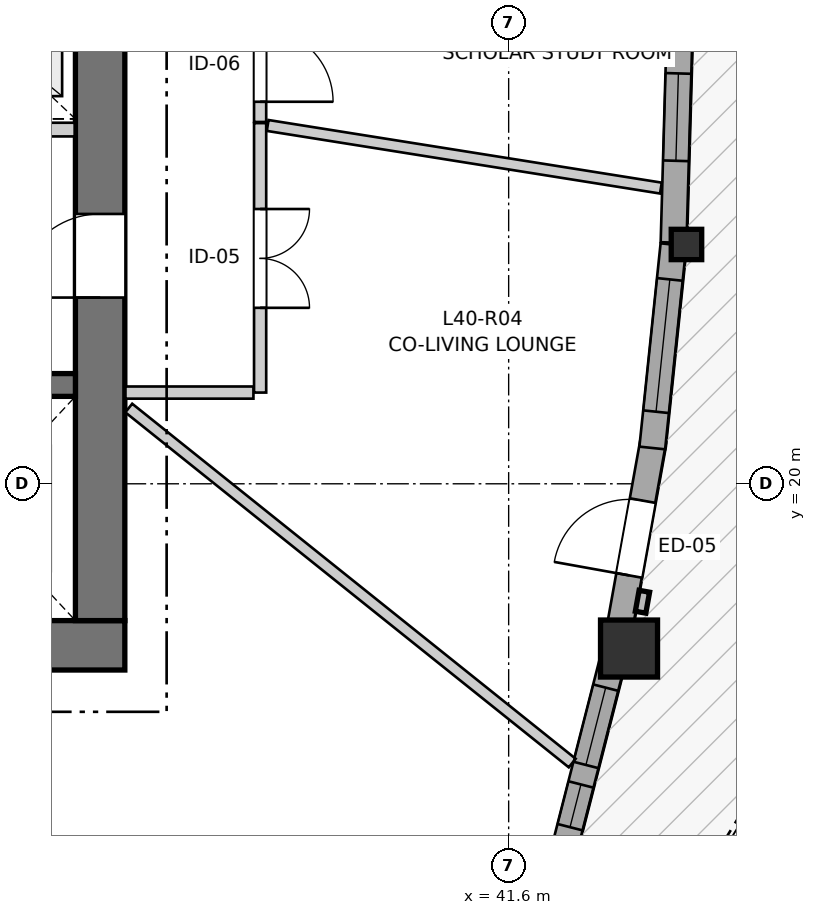
"""IFC4 building model, lengths in metres.
Left out: names, types, materials, properties, quantities, classifications, styles, units other than length and angle.
Written with IfcOpenShell. Run it as: python <this file> out.ifc"""

import sys

from ifc_helpers import new_model, si_unit, direction, frame, frame_2d, origin, origin_2d, place, context, subcontext, project, spatial, rectangle, i_section, extrude, source, transform, mapped, element, fill, save


model = new_model("IFC4")
c1 = context("Model", 3, precision=1e-05, world=origin(), true_north=direction((0.0, 1.0)))
c2 = subcontext(c1, "Body", "Model", "MODEL_VIEW")
j1 = project(units=[si_unit("LENGTHUNIT", "METRE"), si_unit("PLANEANGLEUNIT", "RADIAN")], contexts=[c1])
p1 = place(None, origin())
s1 = spatial("IfcSite", under=j1, at=p1, CompositionType="ELEMENT")
p2 = place(p1, origin())
s2 = spatial("IfcBuilding", under=s1, at=p2, CompositionType="ELEMENT")
p3 = place(p2, frame((0.0, 0.0, 136.2)))
s3 = spatial("IfcBuildingStorey", under=s2, at=p3, CompositionType="ELEMENT", Elevation=136.2)
p4 = place(p3, frame((24.15, 17.875, 0.0), z_axis=(0.0, 0.0, 1.0), x_axis=(1.0, 0.0, 0.0)))
e1 = element("IfcWall", 1, at=p4, inside=s3, PredefinedType="SHEAR", context=c2, shape_type="SweptSolid", body=[
    extrude(rectangle(XDim=12.4, YDim=0.65, at=frame_2d((6.2, 0.0))), origin(), (0.0, 0.0, 1.0), 2.95),
])
p5 = place(p3, frame((36.225, 18.2, 0.0), z_axis=(0.0, 0.0, 1.0), x_axis=(0.0, 1.0, 0.0)))
e2 = element("IfcWall", 2, at=p5, inside=s3, PredefinedType="SHEAR", context=c2, shape_type="SweptSolid", body=[
    extrude(rectangle(XDim=15.6, YDim=0.65, at=frame_2d((7.8, 0.0))), origin(), (0.0, 0.0, 1.0), 2.95),
])
p6 = place(p5, frame((4.25, 0.0, 0.0)))
e3 = element("IfcOpeningElement", 3, at=p6, cuts=e2, PredefinedType="OPENING", context=c2, shape_type="SweptSolid", body=[
    extrude(rectangle(XDim=1.1, YDim=2.15, at=frame_2d((0.55, 1.075))), frame((0.0, 0.335, 0.0), z_axis=(0.0, -1.0, 0.0), x_axis=(1.0, 0.0, 0.0)), (0.0, 0.0, 1.0), 0.67),
])
p7 = place(p5, frame((10.25, 0.0, 0.0)))
e4 = element("IfcOpeningElement", 4, at=p7, cuts=e2, PredefinedType="OPENING", context=c2, shape_type="SweptSolid", body=[
    extrude(rectangle(XDim=1.1, YDim=2.15, at=frame_2d((0.55, 1.075))), frame((0.0, 0.335, 0.0), z_axis=(0.0, -1.0, 0.0), x_axis=(1.0, 0.0, 0.0)), (0.0, 0.0, 1.0), 0.67),
])
p8 = place(p3, frame((24.8, 21.3, 0.0), z_axis=(0.0, 0.0, 1.0), x_axis=(1.0, 0.0, 0.0)))
e5 = element("IfcWall", 5, at=p8, inside=s3, PredefinedType="SHEAR", context=c2, shape_type="SweptSolid", body=[
    extrude(rectangle(XDim=11.1, YDim=0.3, at=frame_2d((5.55, 0.0))), origin(), (0.0, 0.0, 1.0), 2.95),
])
p9 = place(p8, frame((6.22, 0.0, 0.0)))
e6 = element("IfcOpeningElement", 6, at=p9, cuts=e5, PredefinedType="OPENING", context=c2, shape_type="SweptSolid", body=[
    extrude(rectangle(XDim=0.98, YDim=2.15, at=frame_2d((0.49, 1.075))), frame((0.0, 0.16, 0.0), z_axis=(0.0, -1.0, 0.0), x_axis=(1.0, 0.0, 0.0)), (0.0, 0.0, 1.0), 0.32),
])
p10 = place(p8, frame((9.15, 0.0, 0.0)))
e7 = element("IfcOpeningElement", 7, at=p10, cuts=e5, PredefinedType="OPENING", context=c2, shape_type="SweptSolid", body=[
    extrude(rectangle(XDim=1.15, YDim=2.15, at=frame_2d((0.575, 1.075))), frame((0.0, 0.16, 0.0), z_axis=(0.0, -1.0, 0.0), x_axis=(1.0, 0.0, 0.0)), (0.0, 0.0, 1.0), 0.32),
])
m1 = source(origin(), c2, "Body", "SweptSolid", [
    extrude(rectangle(XDim=0.75, YDim=0.75, at=origin_2d()), origin(), (0.0, 0.0, 1.0), 2.95),
])
p11 = place(p3, frame((43.184, 17.833, 0.0), z_axis=(0.0, 0.0, 1.0), x_axis=(1.0, 0.0, 0.0)))
e8 = element("IfcColumn", 8, at=p11, inside=s3, PredefinedType="COLUMN", context=c2, shape_type="MappedRepresentation", body=[
    mapped(m1, transform((0.0, 0.0, 0.0), x_axis=(1.0, 0.0, 0.0), y_axis=(0.0, 1.0, 0.0), z_axis=(0.0, 0.0, 1.0), scale=1.0)),
])
m2 = source(origin(), c2, "Body", "SweptSolid", [
    extrude(i_section(OverallWidth=0.401, OverallDepth=0.399, WebThickness=0.023, FlangeThickness=0.036, FilletRadius=0.015, at=origin_2d()), origin(), (0.0, 0.0, 1.0), 2.95),
])
p12 = place(p3, frame((43.939, 23.148, 0.0), z_axis=(0.0, 0.0, 1.0), x_axis=(1.0, 0.0, 0.0)))
e9 = element("IfcColumn", 9, at=p12, inside=s3, PredefinedType="PILASTER", context=c2, shape_type="MappedRepresentation", body=[
    mapped(m2, transform((0.0, 0.0, 0.0), x_axis=(1.0, 0.0, 0.0), y_axis=(0.0, 1.0, 0.0), z_axis=(0.0, 0.0, 1.0), scale=1.0)),
])
p13 = place(p3, frame((42.329, 15.177, 0.0), z_axis=(0.0, 0.0, 1.0), x_axis=(0.247819063092, 0.968806333571, 0.0)))
e10 = element("IfcWall", 10, at=p13, inside=s3, PredefinedType="SOLIDWALL", context=c2, shape_type="SweptSolid", body=[
    extrude(rectangle(XDim=2.629, YDim=0.34, at=frame_2d((1.315, 0.0))), origin(), (0.0, 0.0, 1.0), 2.53),
])
p14 = place(p13, frame((0.315, 0.0, 0.82)))
e11 = element("IfcOpeningElement", 11, at=p14, cuts=e10, PredefinedType="OPENING", context=c2, shape_type="SweptSolid", body=[
    extrude(rectangle(XDim=0.58, YDim=1.35, at=frame_2d((0.29, 0.675))), frame((0.0, 0.18, 0.0), z_axis=(0.0, -1.0, 0.0), x_axis=(1.0, 0.0, 0.0)), (0.0, 0.0, 1.0), 0.36),
])
p15 = place(p13, frame((1.16, 0.0, 0.82)))
e12 = element("IfcOpeningElement", 12, at=p15, cuts=e10, PredefinedType="OPENING", context=c2, shape_type="SweptSolid", body=[
    extrude(rectangle(XDim=1.05, YDim=1.45, at=frame_2d((0.525, 0.725))), frame((0.0, 0.18, 0.0), z_axis=(0.0, -1.0, 0.0), x_axis=(1.0, 0.0, 0.0)), (0.0, 0.0, 1.0), 0.36),
])
p16 = place(p3, frame((43.044, 18.015, 0.0), z_axis=(0.0, 0.0, 1.0), x_axis=(0.177114569603, 0.984190240367, 0.0)))
e13 = element("IfcWall", 13, at=p16, inside=s3, PredefinedType="SOLIDWALL", context=c2, shape_type="SweptSolid", body=[
    extrude(rectangle(XDim=2.584, YDim=0.34, at=frame_2d((1.292, 0.0))), origin(), (0.0, 0.0, 1.0), 2.53),
])
p17 = place(p16, frame((0.792, 0.0, 0.0)))
e14 = element("IfcOpeningElement", 14, at=p17, cuts=e13, PredefinedType="OPENING", context=c2, shape_type="SweptSolid", body=[
    extrude(rectangle(XDim=1.0, YDim=2.1, at=frame_2d((0.5, 1.05))), frame((0.0, 0.18, 0.0), z_axis=(0.0, -1.0, 0.0), x_axis=(1.0, 0.0, 0.0)), (0.0, 0.0, 1.0), 0.36),
])
p18 = place(p3, frame((43.49, 20.471, 0.0), z_axis=(0.0, 0.0, 1.0), x_axis=(0.103673439924, 0.99461139037, 0.0)))
e15 = element("IfcWall", 15, at=p18, inside=s3, PredefinedType="SOLIDWALL", context=c2, shape_type="SweptSolid", body=[
    extrude(rectangle(XDim=2.689, YDim=0.34, at=frame_2d((1.345, 0.0))), origin(), (0.0, 0.0, 1.0), 2.53),
])
p19 = place(p18, frame((0.48, 0.0, 0.82)))
e16 = element("IfcOpeningElement", 16, at=p19, cuts=e15, PredefinedType="OPENING", context=c2, shape_type="SweptSolid", body=[
    extrude(rectangle(XDim=1.75, YDim=1.3, at=frame_2d((0.875, 0.65))), frame((0.0, 0.18, 0.0), z_axis=(0.0, -1.0, 0.0), x_axis=(1.0, 0.0, 0.0)), (0.0, 0.0, 1.0), 0.36),
])
p20 = place(p3, frame((43.77, 23.173, 0.0), z_axis=(0.0, 0.0, 1.0), x_axis=(0.028392968923, 0.999596838388, 0.0)))
e17 = element("IfcWall", 17, at=p20, inside=s3, PredefinedType="SOLIDWALL", context=c2, shape_type="SweptSolid", body=[
    extrude(rectangle(XDim=2.674, YDim=0.34, at=frame_2d((1.337, 0.0))), origin(), (0.0, 0.0, 1.0), 2.53),
])
p21 = place(p20, frame((1.076, 0.0, 0.82)))
e18 = element("IfcOpeningElement", 18, at=p21, cuts=e17, PredefinedType="OPENING", context=c2, shape_type="SweptSolid", body=[
    extrude(rectangle(XDim=1.15, YDim=1.2, at=frame_2d((0.575, 0.6))), frame((0.0, 0.18, 0.0), z_axis=(0.0, -1.0, 0.0), x_axis=(1.0, 0.0, 0.0)), (0.0, 0.0, 1.0), 0.36),
])
p22 = place(p3, frame((30.67, 24.66, 0.0), z_axis=(0.0, 0.0, 1.0), x_axis=(1.0, 0.0, 0.0)))
e19 = element("IfcWall", 19, at=p22, inside=s3, PredefinedType="PARTITIONING", context=c2, shape_type="SweptSolid", body=[
    extrude(rectangle(XDim=5.22, YDim=0.18, at=frame_2d((2.61, 0.0))), origin(), (0.0, 0.0, 1.0), 2.95),
])
p23 = place(p22, frame((0.68, 0.0, 0.0)))
e20 = element("IfcOpeningElement", 20, at=p23, cuts=e19, PredefinedType="OPENING", context=c2, shape_type="SweptSolid", body=[
    extrude(rectangle(XDim=0.98, YDim=2.15, at=frame_2d((0.49, 1.075))), frame((0.0, 0.1, 0.0), z_axis=(0.0, -1.0, 0.0), x_axis=(1.0, 0.0, 0.0)), (0.0, 0.0, 1.0), 0.2),
])
p24 = place(p3, frame((38.33, 24.745, 0.0), z_axis=(0.0, 0.0, 1.0), x_axis=(0.0, -1.0, 0.0)))
e21 = element("IfcWall", 21, at=p24, inside=s3, PredefinedType="PARTITIONING", context=c2, shape_type="SweptSolid", body=[
    extrude(rectangle(XDim=3.545, YDim=0.16, at=frame_2d((1.772, 0.0))), origin(), (0.0, 0.0, 1.0), 2.95),
])
p25 = place(p24, frame((1.13, 0.0, 0.0)))
e22 = element("IfcOpeningElement", 22, at=p25, cuts=e21, PredefinedType="OPENING", context=c2, shape_type="SweptSolid", body=[
    extrude(rectangle(XDim=1.3, YDim=2.1, at=frame_2d((0.65, 1.05))), frame((0.0, 0.09, 0.0), z_axis=(0.0, -1.0, 0.0), x_axis=(1.0, 0.0, 0.0)), (0.0, 0.0, 1.0), 0.18),
])
p26 = place(p3, frame((38.33, 26.252, 0.0), z_axis=(0.0, 0.0, 1.0), x_axis=(0.0, -1.0, 0.0)))
e23 = element("IfcWall", 23, at=p26, inside=s3, PredefinedType="PARTITIONING", context=c2, shape_type="SweptSolid", body=[
    extrude(rectangle(XDim=1.492, YDim=0.16, at=frame_2d((0.746, 0.0))), origin(), (0.0, 0.0, 1.0), 2.95),
])
p27 = place(p26, frame((0.266, 0.0, 0.0)))
e24 = element("IfcOpeningElement", 24, at=p27, cuts=e23, PredefinedType="OPENING", context=c2, shape_type="SweptSolid", body=[
    extrude(rectangle(XDim=0.96, YDim=2.1, at=frame_2d((0.48, 1.05))), frame((0.0, 0.09, 0.0), z_axis=(0.0, -1.0, 0.0), x_axis=(1.0, 0.0, 0.0)), (0.0, 0.0, 1.0), 0.18),
])
p28 = place(p3, frame((36.602, 20.997, 0.0), z_axis=(0.0, 0.0, 1.0), x_axis=(0.780696683128, -0.624910144703, 0.0)))
e25 = element("IfcWall", 25, at=p28, inside=s3, PredefinedType="PARTITIONING", context=c2, shape_type="SweptSolid", body=[
    extrude(rectangle(XDim=7.474, YDim=0.145, at=frame_2d((3.737, 0.0))), origin(), (0.0, 0.0, 1.0), 2.95),
])
p29 = place(p3, frame((38.429, 24.714, 0.0), z_axis=(0.0, 0.0, 1.0), x_axis=(0.987561894046, -0.157230739454, 0.0)))
e26 = element("IfcWall", 26, at=p29, inside=s3, PredefinedType="PARTITIONING", context=c2, shape_type="SweptSolid", body=[
    extrude(rectangle(XDim=5.239, YDim=0.145, at=frame_2d((2.62, 0.0))), origin(), (0.0, 0.0, 1.0), 2.95),
])
p30 = place(p3, frame((36.558, 21.2, 0.0), z_axis=(0.0, 0.0, 1.0), x_axis=(1.0, 0.0, 0.0)))
e27 = element("IfcWall", 27, at=p30, inside=s3, PredefinedType="PARTITIONING", context=c2, shape_type="SweptSolid", body=[
    extrude(rectangle(XDim=1.684, YDim=0.16, at=frame_2d((0.842, 0.0))), origin(), (0.0, 0.0, 1.0), 2.95),
])
m3 = source(origin(), c2, "Body", "SweptSolid", [
    extrude(rectangle(XDim=0.58, YDim=1.35, at=frame_2d((0.29, 0.675))), frame((0.0, 0.03, 0.0), z_axis=(0.0, -1.0, 0.0), x_axis=(1.0, 0.0, 0.0)), (0.0, 0.0, 1.0), 0.06),
])
p31 = place(p14, origin())
e28 = element("IfcWindow", 28, at=p31, inside=s3, PartitioningType="SINGLE_PANEL", PredefinedType="WINDOW", context=c2, shape_type="MappedRepresentation", body=[
    mapped(m3, transform((0.0, 0.0, 0.0), x_axis=(1.0, 0.0, 0.0), y_axis=(0.0, 1.0, 0.0), z_axis=(0.0, 0.0, 1.0), scale=1.0)),
])
fill(e11, e28)
m4 = source(origin(), c2, "Body", "SweptSolid", [
    extrude(rectangle(XDim=1.05, YDim=1.45, at=frame_2d((0.525, 0.725))), frame((0.0, 0.03, 0.0), z_axis=(0.0, -1.0, 0.0), x_axis=(1.0, 0.0, 0.0)), (0.0, 0.0, 1.0), 0.06),
])
p32 = place(p15, origin())
e29 = element("IfcWindow", 29, at=p32, inside=s3, PartitioningType="SINGLE_PANEL", PredefinedType="WINDOW", context=c2, shape_type="MappedRepresentation", body=[
    mapped(m4, transform((0.0, 0.0, 0.0), x_axis=(1.0, 0.0, 0.0), y_axis=(0.0, 1.0, 0.0), z_axis=(0.0, 0.0, 1.0), scale=1.0)),
])
fill(e12, e29)
m5 = source(origin(), c2, "Body", "SweptSolid", [
    extrude(rectangle(XDim=1.75, YDim=1.3, at=frame_2d((0.875, 0.65))), frame((0.0, 0.03, 0.0), z_axis=(0.0, -1.0, 0.0), x_axis=(1.0, 0.0, 0.0)), (0.0, 0.0, 1.0), 0.06),
])
p33 = place(p19, origin())
e30 = element("IfcWindow", 30, at=p33, inside=s3, PartitioningType="SINGLE_PANEL", PredefinedType="WINDOW", context=c2, shape_type="MappedRepresentation", body=[
    mapped(m5, transform((0.0, 0.0, 0.0), x_axis=(1.0, 0.0, 0.0), y_axis=(0.0, 1.0, 0.0), z_axis=(0.0, 0.0, 1.0), scale=1.0)),
])
fill(e16, e30)
m6 = source(origin(), c2, "Body", "SweptSolid", [
    extrude(rectangle(XDim=1.15, YDim=1.2, at=frame_2d((0.575, 0.6))), frame((0.0, 0.03, 0.0), z_axis=(0.0, -1.0, 0.0), x_axis=(1.0, 0.0, 0.0)), (0.0, 0.0, 1.0), 0.06),
])
p34 = place(p21, origin())
e31 = element("IfcWindow", 31, at=p34, inside=s3, PartitioningType="SINGLE_PANEL", PredefinedType="WINDOW", context=c2, shape_type="MappedRepresentation", body=[
    mapped(m6, transform((0.0, 0.0, 0.0), x_axis=(1.0, 0.0, 0.0), y_axis=(0.0, 1.0, 0.0), z_axis=(0.0, 0.0, 1.0), scale=1.0)),
])
fill(e18, e31)
m7 = source(origin(), c2, "Body", "SweptSolid", [
    extrude(rectangle(XDim=1.0, YDim=2.1, at=frame_2d((0.5, 1.05))), frame((0.0, 0.025, 0.0), z_axis=(0.0, -1.0, 0.0), x_axis=(1.0, 0.0, 0.0)), (0.0, 0.0, 1.0), 0.05),
])
p35 = place(p17, origin())
e32 = element("IfcDoor", 32, at=p35, inside=s3, OperationType="SINGLE_SWING_LEFT", PredefinedType="DOOR", context=c2, shape_type="MappedRepresentation", body=[
    mapped(m7, transform((0.0, 0.0, 0.0), x_axis=(1.0, 0.0, 0.0), y_axis=(0.0, 1.0, 0.0), z_axis=(0.0, 0.0, 1.0), scale=1.0)),
])
fill(e14, e32)
m8 = source(origin(), c2, "Body", "SweptSolid", [
    extrude(rectangle(XDim=1.1, YDim=2.15, at=frame_2d((0.55, 1.075))), frame((0.0, 0.025, 0.0), z_axis=(0.0, -1.0, 0.0), x_axis=(1.0, 0.0, 0.0)), (0.0, 0.0, 1.0), 0.05),
])
p36 = place(p6, origin())
e33 = element("IfcDoor", 33, at=p36, inside=s3, OperationType="SINGLE_SWING_LEFT", PredefinedType="DOOR", context=c2, shape_type="MappedRepresentation", body=[
    mapped(m8, transform((0.0, 0.0, 0.0), x_axis=(1.0, 0.0, 0.0), y_axis=(0.0, 1.0, 0.0), z_axis=(0.0, 0.0, 1.0), scale=1.0)),
])
fill(e3, e33)
m9 = source(origin(), c2, "Body", "SweptSolid", [
    extrude(rectangle(XDim=1.3, YDim=2.1, at=frame_2d((0.65, 1.05))), frame((0.0, 0.025, 0.0), z_axis=(0.0, -1.0, 0.0), x_axis=(1.0, 0.0, 0.0)), (0.0, 0.0, 1.0), 0.05),
])
p37 = place(p25, origin())
e34 = element("IfcDoor", 34, at=p37, inside=s3, OperationType="DOUBLE_DOOR_SINGLE_SWING", PredefinedType="DOOR", context=c2, shape_type="MappedRepresentation", body=[
    mapped(m9, transform((0.0, 0.0, 0.0), x_axis=(1.0, 0.0, 0.0), y_axis=(0.0, 1.0, 0.0), z_axis=(0.0, 0.0, 1.0), scale=1.0)),
])
fill(e22, e34)
m10 = source(origin(), c2, "Body", "SweptSolid", [
    extrude(rectangle(XDim=0.96, YDim=2.1, at=frame_2d((0.48, 1.05))), frame((0.0, 0.025, 0.0), z_axis=(0.0, -1.0, 0.0), x_axis=(1.0, 0.0, 0.0)), (0.0, 0.0, 1.0), 0.05),
])
p38 = place(p27, origin())
e35 = element("IfcDoor", 35, at=p38, inside=s3, OperationType="SINGLE_SWING_RIGHT", PredefinedType="DOOR", context=c2, shape_type="MappedRepresentation", body=[
    mapped(m10, transform((0.0, 0.0, 0.0), x_axis=(1.0, 0.0, 0.0), y_axis=(0.0, 1.0, 0.0), z_axis=(0.0, 0.0, 1.0), scale=1.0)),
])
fill(e24, e35)
save(model, sys.argv[1])
